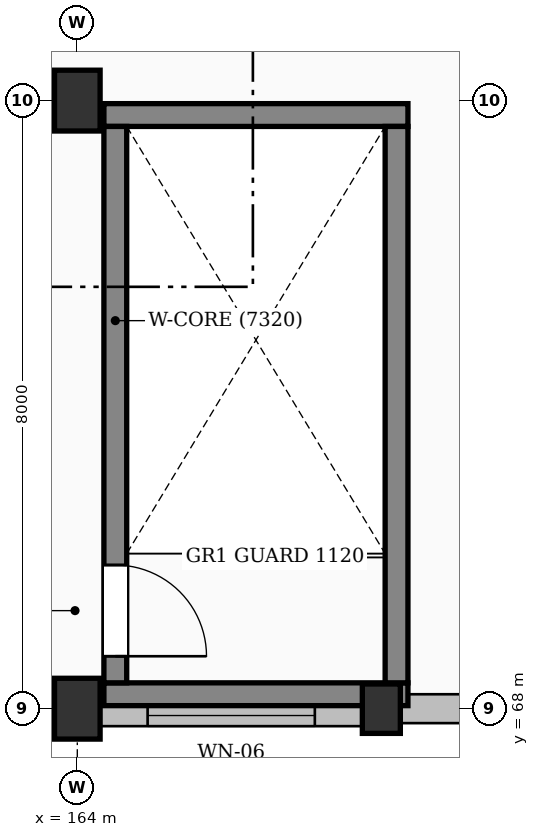
"""IFC4 building model, lengths in metres.
Left out: names, types, materials, properties, quantities, classifications, styles, units other than length and angle.
Written with IfcOpenShell. Run it as: python <this file> out.ifc"""

import sys

from ifc_helpers import new_model, si_unit, direction, frame, frame_2d, origin, origin_2d, place, context, subcontext, project, spatial, rectangle, extrude, element, fill, save


model = new_model("IFC4")
c1 = context("Model", 3, precision=1e-05, world=origin(), true_north=direction((0.0, 1.0)))
c2 = subcontext(c1, "Body", "Model", "MODEL_VIEW")
j1 = project(units=[si_unit("LENGTHUNIT", "METRE"), si_unit("PLANEANGLEUNIT", "RADIAN")], contexts=[c1])
p1 = place(None, origin())
s1 = spatial("IfcSite", under=j1, at=p1, CompositionType="ELEMENT")
p2 = place(p1, origin())
s2 = spatial("IfcBuilding", under=s1, at=p2, CompositionType="ELEMENT")
p3 = place(p2, frame((0.0, 0.0, 13.8)))
s3 = spatial("IfcBuildingStorey", under=s2, at=p3, CompositionType="ELEMENT", Elevation=13.8)
for number, where, z_axis, x_axis in (
    (1, (164.0, 68.0, 0.0), (0.0, 0.0, 1.0), (1.0, 0.0, 0.0)),
    (2, (164.0, 76.0, 0.0), (0.0, 0.0, 1.0), (1.0, 0.0, 0.0)),
):
    element("IfcColumn", number, at=place(p3, frame(where, z_axis=z_axis, x_axis=x_axis)), inside=s3, PredefinedType="COLUMN", context=c2, shape_type="SweptSolid", body=[
        extrude(rectangle(XDim=0.6, YDim=0.8, at=origin_2d()), origin(), (0.0, 0.0, 1.0), 4.5),
    ])
p4 = place(p3, frame((168.0, 68.0, 0.0), z_axis=(0.0, 0.0, 1.0), x_axis=(1.0, 0.0, 0.0)))
e3 = element("IfcColumn", 3, at=p4, inside=s3, PredefinedType="PILASTER", context=c2, shape_type="SweptSolid", body=[
    extrude(rectangle(XDim=0.5, YDim=0.65, at=origin_2d()), origin(), (0.0, 0.0, 1.0), 4.5),
])
p5 = place(p3, frame((171.75, 68.0, 0.0), z_axis=(0.0, 0.0, 1.0), x_axis=(-1.0, 0.0, 0.0)))
e4 = element("IfcWall", 4, at=p5, inside=s3, PredefinedType="SOLIDWALL", context=c2, shape_type="SweptSolid", body=[
    extrude(rectangle(XDim=3.5, YDim=0.38, at=frame_2d((1.75, 0.0))), origin(), (0.0, 0.0, 1.0), 4.125),
])
p6 = place(p5, frame((0.95, 0.0, 0.95)))
e5 = element("IfcOpeningElement", 5, at=p6, cuts=e4, PredefinedType="OPENING", context=c2, shape_type="SweptSolid", body=[
    extrude(rectangle(XDim=1.6, YDim=1.8, at=frame_2d((0.8, 0.9))), frame((0.0, 0.2, 0.0), z_axis=(0.0, -1.0, 0.0), x_axis=(1.0, 0.0, 0.0)), (0.0, 0.0, 1.0), 0.4),
])
p7 = place(p3, frame((167.75, 67.91, 0.0), z_axis=(0.0, 0.0, 1.0), x_axis=(-1.0, 0.0, 0.0)))
e6 = element("IfcWall", 6, at=p7, inside=s3, PredefinedType="SOLIDWALL", context=c2, shape_type="SweptSolid", body=[
    extrude(rectangle(XDim=3.45, YDim=0.28, at=frame_2d((1.725, 0.0))), origin(), (0.0, 0.0, 1.0), 4.125),
])
p8 = place(p7, frame((0.625, 0.0, 0.95)))
e7 = element("IfcOpeningElement", 7, at=p8, cuts=e6, PredefinedType="OPENING", context=c2, shape_type="SweptSolid", body=[
    extrude(rectangle(XDim=2.2, YDim=1.8, at=frame_2d((1.1, 0.9))), frame((0.0, 0.15, 0.0), z_axis=(0.0, -1.0, 0.0), x_axis=(1.0, 0.0, 0.0)), (0.0, 0.0, 1.0), 0.3),
])
p9 = place(p3, frame((163.7, 68.0, 0.0), z_axis=(0.0, 0.0, 1.0), x_axis=(-1.0, 0.0, 0.0)))
e8 = element("IfcWall", 8, at=p9, inside=s3, PredefinedType="SOLIDWALL", context=c2, shape_type="SweptSolid", body=[
    extrude(rectangle(XDim=3.5, YDim=0.38, at=frame_2d((1.75, 0.0))), origin(), (0.0, 0.0, 1.0), 4.125),
])
p10 = place(p9, frame((1.0, 0.0, 0.95)))
e9 = element("IfcOpeningElement", 9, at=p10, cuts=e8, PredefinedType="OPENING", context=c2, shape_type="SweptSolid", body=[
    extrude(rectangle(XDim=1.5, YDim=1.5, at=frame_2d((0.75, 0.75))), frame((0.0, 0.2, 0.0), z_axis=(0.0, -1.0, 0.0), x_axis=(1.0, 0.0, 0.0)), (0.0, 0.0, 1.0), 0.4),
])
for number, where, z_axis, x_axis in (
    (10, (164.35, 68.19, 0.0), (0.0, 0.0, 1.0), (1.0, 0.0, 0.0)),
    (11, (168.35, 75.81, 0.0), (0.0, 0.0, 1.0), (-1.0, 0.0, 0.0)),
):
    element("IfcWall", number, at=place(p3, frame(where, z_axis=z_axis, x_axis=x_axis)), inside=s3, PredefinedType="SHEAR", context=c2, shape_type="SweptSolid", body=[
        extrude(rectangle(XDim=4.0, YDim=0.3, at=frame_2d((2.0, 0.0))), origin(), (0.0, 0.0, 1.0), 4.25),
    ])
p11 = place(p3, frame((164.5, 75.66, 0.0), z_axis=(0.0, 0.0, 1.0), x_axis=(0.0, -1.0, 0.0)))
e12 = element("IfcWall", 12, at=p11, inside=s3, PredefinedType="SHEAR", context=c2, shape_type="SweptSolid", body=[
    extrude(rectangle(XDim=7.32, YDim=0.3, at=frame_2d((3.66, 0.0))), origin(), (0.0, 0.0, 1.0), 4.25),
])
p12 = place(p11, frame((5.77, 0.0, 0.0)))
e13 = element("IfcOpeningElement", 13, at=p12, cuts=e12, PredefinedType="OPENING", context=c2, shape_type="SweptSolid", body=[
    extrude(rectangle(XDim=1.2, YDim=2.15, at=frame_2d((0.6, 1.075))), frame((0.0, 0.16, 0.0), z_axis=(0.0, -1.0, 0.0), x_axis=(1.0, 0.0, 0.0)), (0.0, 0.0, 1.0), 0.32),
])
p13 = place(p3, frame((168.2, 75.66, 0.0), z_axis=(0.0, 0.0, 1.0), x_axis=(0.0, -1.0, 0.0)))
e14 = element("IfcWall", 14, at=p13, inside=s3, PredefinedType="SHEAR", context=c2, shape_type="SweptSolid", body=[
    extrude(rectangle(XDim=7.32, YDim=0.3, at=frame_2d((3.66, 0.0))), origin(), (0.0, 0.0, 1.0), 4.25),
])
p14 = place(p8, origin())
e15 = element("IfcWindow", 15, at=p14, inside=s3, PartitioningType="TRIPLE_PANEL_VERTICAL", PredefinedType="WINDOW", context=c2, shape_type="SweptSolid", body=[
    extrude(rectangle(XDim=2.2, YDim=1.8, at=frame_2d((1.1, 0.9))), frame((0.0, 0.03, 0.0), z_axis=(0.0, -1.0, 0.0), x_axis=(1.0, 0.0, 0.0)), (0.0, 0.0, 1.0), 0.06),
])
fill(e7, e15)
p15 = place(p12, origin())
e16 = element("IfcDoor", 16, at=p15, inside=s3, OperationType="SINGLE_SWING_RIGHT", PredefinedType="DOOR", context=c2, shape_type="SweptSolid", body=[
    extrude(rectangle(XDim=1.2, YDim=2.15, at=frame_2d((0.6, 1.075))), frame((0.0, 0.025, 0.0), z_axis=(0.0, -1.0, 0.0), x_axis=(1.0, 0.0, 0.0)), (0.0, 0.0, 1.0), 0.05),
])
fill(e13, e16)
save(model, sys.argv[1])
